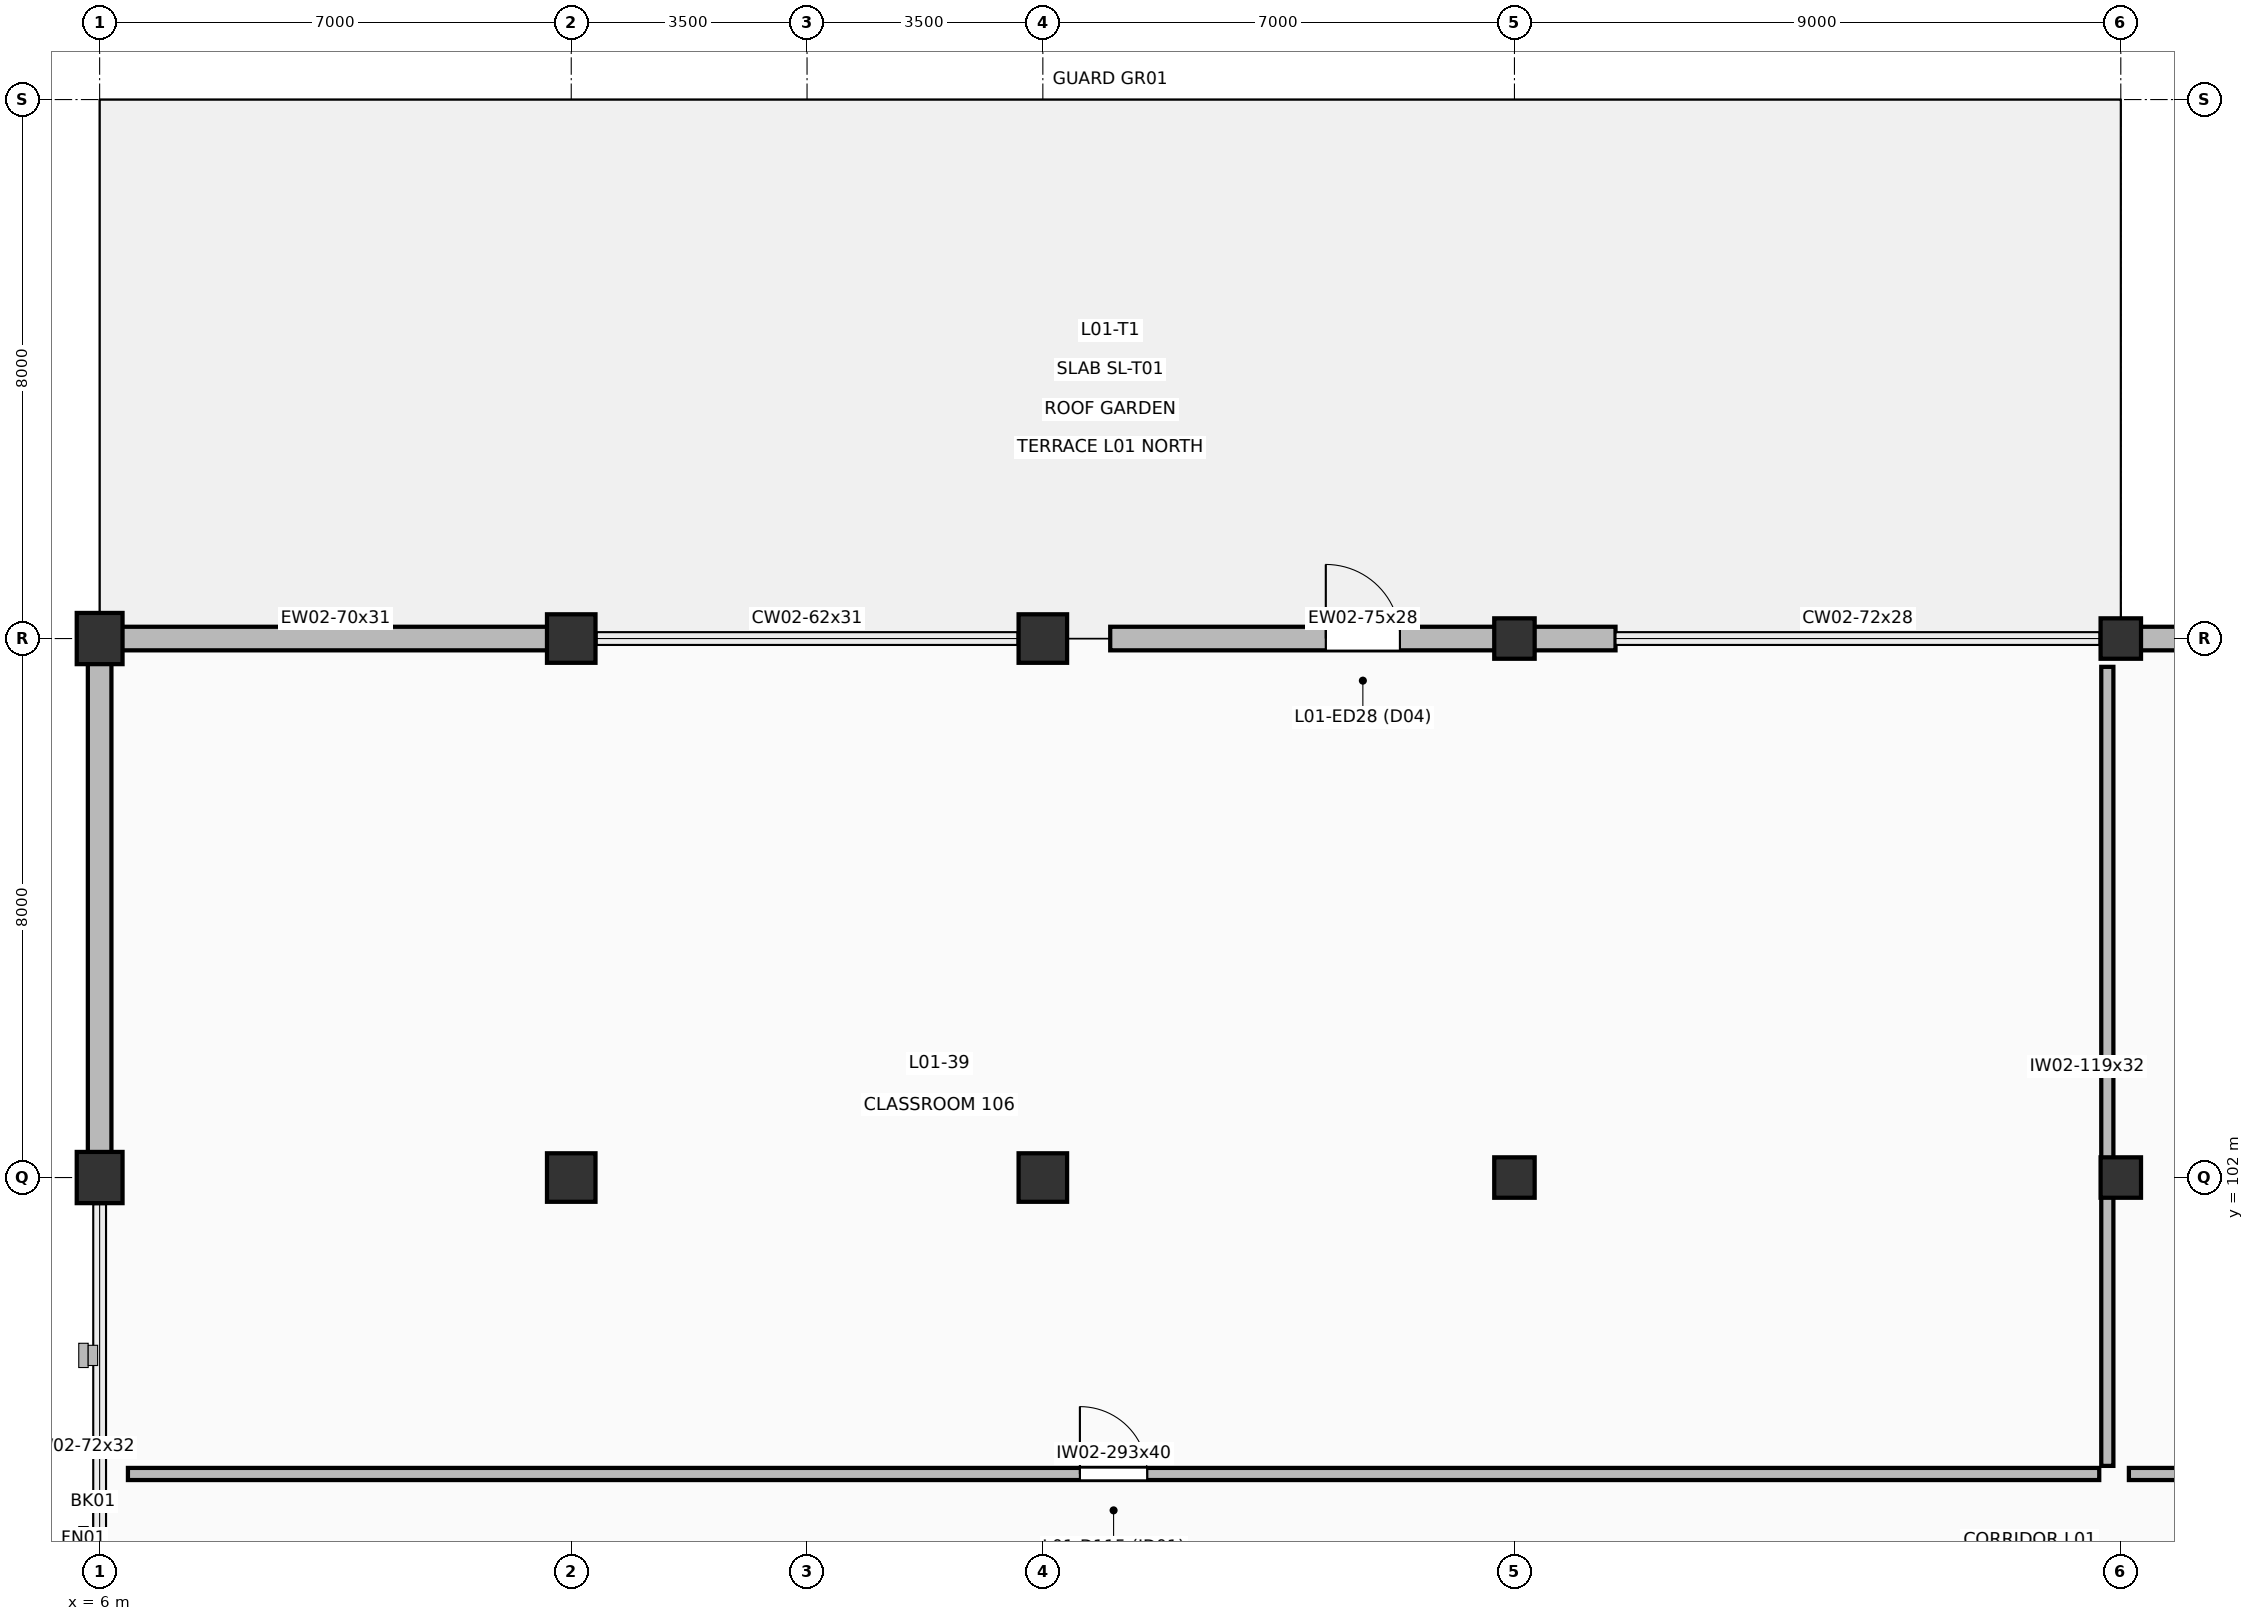
"""IFC4 building model, lengths in metres.
Left out: names, types, materials, properties, quantities, classifications, styles, units other than length and angle.
Written with IfcOpenShell. Run it as: python <this file> out.ifc"""

import sys

from ifc_helpers import new_model, si_unit, direction, frame, frame_2d, origin, origin_2d, place, context, subcontext, project, spatial, rectangle, circle, extrude, element, fill, save


model = new_model("IFC4")
c1 = context("Model", 3, precision=1e-05, world=origin(), true_north=direction((0.0, 1.0)))
c2 = subcontext(c1, "Body", "Model", "MODEL_VIEW")
j1 = project(units=[si_unit("LENGTHUNIT", "METRE"), si_unit("PLANEANGLEUNIT", "RADIAN")], contexts=[c1])
p1 = place(None, origin())
s1 = spatial("IfcSite", under=j1, at=p1, CompositionType="ELEMENT")
p2 = place(p1, origin())
s2 = spatial("IfcBuilding", under=s1, at=p2, CompositionType="ELEMENT")
p3 = place(p2, frame((0.0, 0.0, 5.4)))
s3 = spatial("IfcBuildingStorey", under=s2, at=p3, CompositionType="ELEMENT", Elevation=5.4)
for number, where, z_axis, x_axis in (
    (1, (6.0, 102.0, 0.0), (0.0, 0.0, 1.0), (1.0, 0.0, 0.0)),
    (2, (6.0, 110.0, 0.0), (0.0, 0.0, 1.0), (1.0, 0.0, 0.0)),
):
    element("IfcColumn", number, at=place(p3, frame(where, z_axis=z_axis, x_axis=x_axis)), inside=s3, PredefinedType="PILASTER", context=c2, shape_type="SweptSolid", body=[
        extrude(rectangle(XDim=0.68, YDim=0.76, at=origin_2d()), origin(), (0.0, 0.0, 1.0), 4.2),
    ])
for number, where, z_axis, x_axis in (
    (3, (13.0, 102.0, 0.0), (0.0, 0.0, 1.0), (1.0, 0.0, 0.0)),
    (4, (13.0, 110.0, 0.0), (0.0, 0.0, 1.0), (1.0, 0.0, 0.0)),
    (5, (20.0, 102.0, 0.0), (0.0, 0.0, 1.0), (1.0, 0.0, 0.0)),
    (6, (20.0, 110.0, 0.0), (0.0, 0.0, 1.0), (1.0, 0.0, 0.0)),
):
    element("IfcColumn", number, at=place(p3, frame(where, z_axis=z_axis, x_axis=x_axis)), inside=s3, PredefinedType="COLUMN", context=c2, shape_type="SweptSolid", body=[
        extrude(circle(Radius=0.36, at=origin_2d()), origin(), (0.0, 0.0, 1.0), 4.2),
    ])
for number, where, z_axis, x_axis in (
    (7, (27.0, 102.0, 0.0), (0.0, 0.0, 1.0), (1.0, 0.0, 0.0)),
    (8, (27.0, 110.0, 0.0), (0.0, 0.0, 1.0), (1.0, 0.0, 0.0)),
    (9, (36.0, 102.0, 0.0), (0.0, 0.0, 1.0), (1.0, 0.0, 0.0)),
    (10, (36.0, 110.0, 0.0), (0.0, 0.0, 1.0), (1.0, 0.0, 0.0)),
):
    element("IfcColumn", number, at=place(p3, frame(where, z_axis=z_axis, x_axis=x_axis)), inside=s3, PredefinedType="COLUMN", context=c2, shape_type="SweptSolid", body=[
        extrude(rectangle(XDim=0.6, YDim=0.6, at=origin_2d()), origin(), (0.0, 0.0, 1.0), 4.2),
    ])
p4 = place(p3, frame((6.0, 102.0, 0.0), z_axis=(0.0, 0.0, 1.0), x_axis=(0.0, 1.0, 0.0)))
e11 = element("IfcWall", 11, at=p4, inside=s3, PredefinedType="SOLIDWALL", context=c2, shape_type="SweptSolid", body=[
    extrude(rectangle(XDim=8.0, YDim=0.35, at=frame_2d((4.0, 0.0))), origin(), (0.0, 0.0, 1.0), 3.225),
])
p5 = place(p3, frame((6.0, 110.0, 0.0), z_axis=(0.0, 0.0, 1.0), x_axis=(1.0, 0.0, 0.0)))
e12 = element("IfcWall", 12, at=p5, inside=s3, PredefinedType="SOLIDWALL", context=c2, shape_type="SweptSolid", body=[
    extrude(rectangle(XDim=7.0, YDim=0.35, at=frame_2d((3.5, 0.0))), origin(), (0.0, 0.0, 1.0), 3.135),
])
p6 = place(p3, frame((21.0, 110.0, 0.0), z_axis=(0.0, 0.0, 1.0), x_axis=(1.0, 0.0, 0.0)))
e13 = element("IfcWall", 13, at=p6, inside=s3, PredefinedType="SOLIDWALL", context=c2, shape_type="SweptSolid", body=[
    extrude(rectangle(XDim=7.5, YDim=0.35, at=frame_2d((3.75, 0.0))), origin(), (0.0, 0.0, 1.0), 2.765),
])
p7 = place(p6, frame((3.2, 0.0, 0.0)))
e14 = element("IfcOpeningElement", 14, at=p7, cuts=e13, PredefinedType="OPENING", context=c2, shape_type="SweptSolid", body=[
    extrude(rectangle(XDim=1.1, YDim=2.2, at=frame_2d((0.55, 1.1))), frame((0.0, 0.185, 0.0), z_axis=(0.0, -1.0, 0.0), x_axis=(1.0, 0.0, 0.0)), (0.0, 0.0, 1.0), 0.37),
])
p8 = place(p3, frame((36.0, 110.0, 0.0), z_axis=(0.0, 0.0, 1.0), x_axis=(1.0, 0.0, 0.0)))
e15 = element("IfcWall", 15, at=p8, inside=s3, PredefinedType="SOLIDWALL", context=c2, shape_type="SweptSolid", body=[
    extrude(rectangle(XDim=8.0, YDim=0.35, at=frame_2d((4.0, 0.0))), origin(), (0.0, 0.0, 1.0), 3.135),
])
p9 = place(p3, frame((6.42, 97.6, 0.0), z_axis=(0.0, 0.0, 1.0), x_axis=(1.0, 0.0, 0.0)))
e16 = element("IfcWall", 16, at=p9, inside=s3, PredefinedType="PARTITIONING", context=c2, shape_type="SweptSolid", body=[
    extrude(rectangle(XDim=29.26, YDim=0.18, at=frame_2d((14.63, 0.0))), origin(), (0.0, 0.0, 1.0), 3.98),
])
p10 = place(p9, frame((14.13, 0.0, 0.0)))
e17 = element("IfcOpeningElement", 17, at=p10, cuts=e16, PredefinedType="OPENING", context=c2, shape_type="SweptSolid", body=[
    extrude(rectangle(XDim=1.0, YDim=2.15, at=frame_2d((0.5, 1.075))), frame((0.0, 0.1, 0.0), z_axis=(0.0, -1.0, 0.0), x_axis=(1.0, 0.0, 0.0)), (0.0, 0.0, 1.0), 0.2),
])
p11 = place(p3, frame((35.8, 97.72, 0.0), z_axis=(0.0, 0.0, 1.0), x_axis=(0.0, 1.0, 0.0)))
e18 = element("IfcWall", 18, at=p11, inside=s3, PredefinedType="PARTITIONING", context=c2, shape_type="SweptSolid", body=[
    extrude(rectangle(XDim=11.86, YDim=0.18, at=frame_2d((5.93, 0.0))), origin(), (0.0, 0.0, 1.0), 3.225),
])
p12 = place(p3, frame((36.12, 97.6, 0.0), z_axis=(0.0, 0.0, 1.0), x_axis=(1.0, 0.0, 0.0)))
e19 = element("IfcWall", 19, at=p12, inside=s3, PredefinedType="PARTITIONING", context=c2, shape_type="SweptSolid", body=[
    extrude(rectangle(XDim=23.76, YDim=0.18, at=frame_2d((11.88, 0.0))), origin(), (0.0, 0.0, 1.0), 3.98),
])
p13 = place(p12, frame((11.38, 0.0, 0.0)))
e20 = element("IfcOpeningElement", 20, at=p13, cuts=e19, PredefinedType="OPENING", context=c2, shape_type="SweptSolid", body=[
    extrude(rectangle(XDim=1.0, YDim=2.15, at=frame_2d((0.5, 1.075))), frame((0.0, 0.1, 0.0), z_axis=(0.0, -1.0, 0.0), x_axis=(1.0, 0.0, 0.0)), (0.0, 0.0, 1.0), 0.2),
])
p14 = place(p7, origin())
e21 = element("IfcDoor", 21, at=p14, inside=s3, OperationType="SINGLE_SWING_LEFT", PredefinedType="DOOR", context=c2, shape_type="SweptSolid", body=[
    extrude(rectangle(XDim=1.1, YDim=2.2, at=frame_2d((0.55, 1.1))), frame((0.0, 0.025, 0.0), z_axis=(0.0, -1.0, 0.0), x_axis=(1.0, 0.0, 0.0)), (0.0, 0.0, 1.0), 0.05),
])
fill(e14, e21)
p15 = place(p10, origin())
e22 = element("IfcDoor", 22, at=p15, inside=s3, OperationType="SINGLE_SWING_LEFT", PredefinedType="DOOR", context=c2, shape_type="SweptSolid", body=[
    extrude(rectangle(XDim=1.0, YDim=2.15, at=frame_2d((0.5, 1.075))), frame((0.0, 0.025, 0.0), z_axis=(0.0, -1.0, 0.0), x_axis=(1.0, 0.0, 0.0)), (0.0, 0.0, 1.0), 0.05),
])
fill(e17, e22)
save(model, sys.argv[1])
